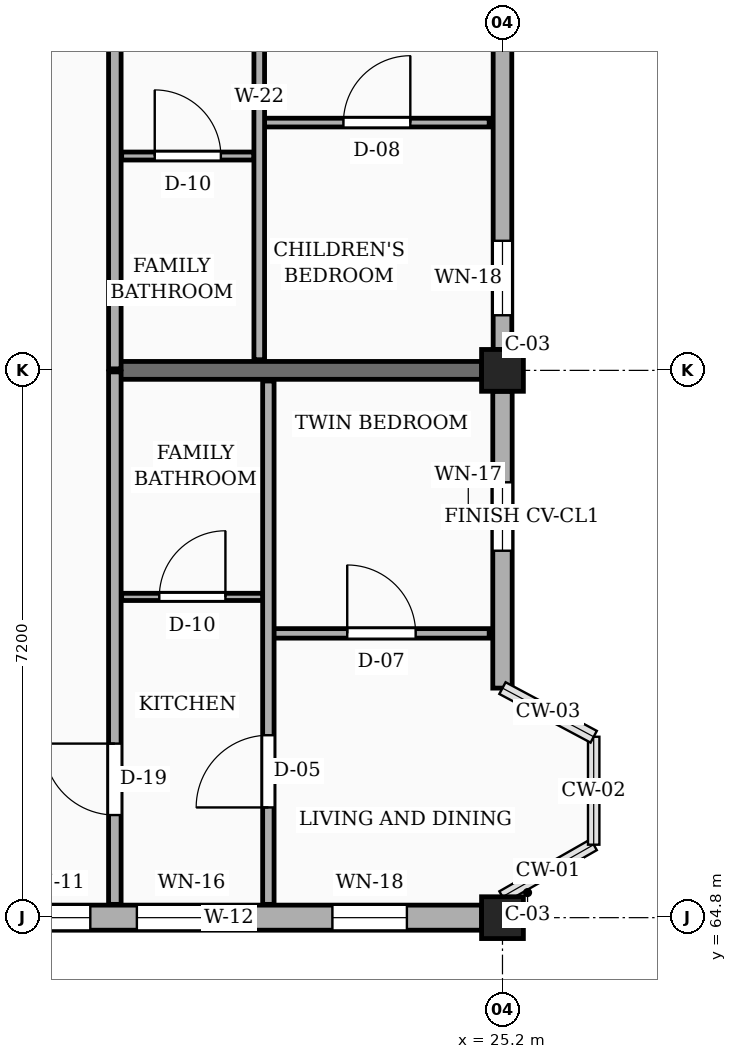
"""IFC4 building model, lengths in metres.
Left out: names, types, materials, properties, quantities, classifications, styles, units other than length and angle.
Written with IfcOpenShell. Run it as: python <this file> out.ifc"""

import sys

from ifc_helpers import new_model, si_unit, direction, frame, frame_2d, origin, origin_2d, place, context, subcontext, project, spatial, rectangle, extrude, element, fill, save


model = new_model("IFC4")
c1 = context("Model", 3, precision=1e-05, world=origin(), true_north=direction((0.0, 1.0)))
c2 = subcontext(c1, "Body", "Model", "MODEL_VIEW")
j1 = project(units=[si_unit("LENGTHUNIT", "METRE"), si_unit("PLANEANGLEUNIT", "RADIAN")], contexts=[c1])
p1 = place(None, origin())
s1 = spatial("IfcSite", under=j1, at=p1, CompositionType="ELEMENT")
p2 = place(p1, origin())
s2 = spatial("IfcBuilding", under=s1, at=p2, CompositionType="ELEMENT")
p3 = place(p2, frame((0.0, 0.0, 17.1)))
s3 = spatial("IfcBuildingStorey", under=s2, at=p3, CompositionType="ELEMENT", Elevation=17.1)
for number, where, z_axis, x_axis in (
    (1, (25.2, 64.8, 0.0), (0.0, 0.0, 1.0), (1.0, 0.0, 0.0)),
    (2, (25.2, 72.0, 0.0), (0.0, 0.0, 1.0), (1.0, 0.0, 0.0)),
):
    element("IfcColumn", number, at=place(p3, frame(where, z_axis=z_axis, x_axis=x_axis)), inside=s3, PredefinedType="COLUMN", context=c2, shape_type="SweptSolid", body=[
        extrude(rectangle(XDim=0.55, YDim=0.55, at=origin_2d()), origin(), (0.0, 0.0, 1.0), 3.15),
    ])
p4 = place(p3, frame((20.1, 72.0, 0.0), z_axis=(0.0, 0.0, 1.0), x_axis=(1.0, 0.0, 0.0)))
e3 = element("IfcWall", 3, at=p4, inside=s3, PredefinedType="SOLIDWALL", context=c2, shape_type="SweptSolid", body=[
    extrude(rectangle(XDim=4.825, YDim=0.235, at=frame_2d((2.413, 0.0))), origin(), (0.0, 0.0, 1.0), 2.21),
])
p5 = place(p3, frame((18.275, 64.8, 0.0), z_axis=(0.0, 0.0, 1.0), x_axis=(1.0, 0.0, 0.0)))
e4 = element("IfcWall", 4, at=p5, inside=s3, PredefinedType="SOLIDWALL", context=c2, shape_type="SweptSolid", body=[
    extrude(rectangle(XDim=6.65, YDim=0.33, at=frame_2d((3.325, 0.0))), origin(), (0.0, 0.0, 1.0), 2.48),
])
p6 = place(p5, frame((0.462, 0.0, 0.78)))
e5 = element("IfcOpeningElement", 5, at=p6, cuts=e4, PredefinedType="OPENING", context=c2, shape_type="SweptSolid", body=[
    extrude(rectangle(XDim=1.04, YDim=1.26, at=frame_2d((0.52, 0.63))), frame((0.0, 0.175, 0.0), z_axis=(0.0, -1.0, 0.0), x_axis=(1.0, 0.0, 0.0)), (0.0, 0.0, 1.0), 0.35),
])
p7 = place(p5, frame((2.115, 0.0, 0.78)))
e6 = element("IfcOpeningElement", 6, at=p7, cuts=e4, PredefinedType="OPENING", context=c2, shape_type="SweptSolid", body=[
    extrude(rectangle(XDim=1.44, YDim=1.26, at=frame_2d((0.72, 0.63))), frame((0.0, 0.175, 0.0), z_axis=(0.0, -1.0, 0.0), x_axis=(1.0, 0.0, 0.0)), (0.0, 0.0, 1.0), 0.35),
])
p8 = place(p5, frame((4.688, 0.0, 0.78)))
e7 = element("IfcOpeningElement", 7, at=p8, cuts=e4, PredefinedType="OPENING", context=c2, shape_type="SweptSolid", body=[
    extrude(rectangle(XDim=0.98, YDim=1.36, at=frame_2d((0.49, 0.68))), frame((0.0, 0.175, 0.0), z_axis=(0.0, -1.0, 0.0), x_axis=(1.0, 0.0, 0.0)), (0.0, 0.0, 1.0), 0.35),
])
p9 = place(p3, frame((25.2, 67.82, 0.0), z_axis=(0.0, 0.0, 1.0), x_axis=(0.0, 1.0, 0.0)))
e8 = element("IfcWall", 8, at=p9, inside=s3, PredefinedType="SOLIDWALL", context=c2, shape_type="SweptSolid", body=[
    extrude(rectangle(XDim=3.905, YDim=0.255, at=frame_2d((1.953, 0.0))), origin(), (0.0, 0.0, 1.0), 2.48),
])
p10 = place(p9, frame((1.808, 0.0, 0.78)))
e9 = element("IfcOpeningElement", 9, at=p10, cuts=e8, PredefinedType="OPENING", context=c2, shape_type="SweptSolid", body=[
    extrude(rectangle(XDim=0.9, YDim=1.36, at=frame_2d((0.45, 0.68))), frame((0.0, 0.137, 0.0), z_axis=(0.0, -1.0, 0.0), x_axis=(1.0, 0.0, 0.0)), (0.0, 0.0, 1.0), 0.275),
])
p11 = place(p3, frame((25.2, 72.275, 0.0), z_axis=(0.0, 0.0, 1.0), x_axis=(0.0, 1.0, 0.0)))
e10 = element("IfcWall", 10, at=p11, inside=s3, PredefinedType="SOLIDWALL", context=c2, shape_type="SweptSolid", body=[
    extrude(rectangle(XDim=6.65, YDim=0.245, at=frame_2d((3.325, 0.0))), origin(), (0.0, 0.0, 1.0), 2.48),
])
p12 = place(p11, frame((0.45, 0.0, 0.78)))
e11 = element("IfcOpeningElement", 11, at=p12, cuts=e10, PredefinedType="OPENING", context=c2, shape_type="SweptSolid", body=[
    extrude(rectangle(XDim=0.98, YDim=1.36, at=frame_2d((0.49, 0.68))), frame((0.0, 0.133, 0.0), z_axis=(0.0, -1.0, 0.0), x_axis=(1.0, 0.0, 0.0)), (0.0, 0.0, 1.0), 0.265),
])
p13 = place(p11, frame((4.65, 0.0, 0.78)))
e12 = element("IfcOpeningElement", 12, at=p13, cuts=e10, PredefinedType="OPENING", context=c2, shape_type="SweptSolid", body=[
    extrude(rectangle(XDim=1.14, YDim=1.36, at=frame_2d((0.57, 0.68))), frame((0.0, 0.133, 0.0), z_axis=(0.0, -1.0, 0.0), x_axis=(1.0, 0.0, 0.0)), (0.0, 0.0, 1.0), 0.265),
])
p14 = place(p3, frame((20.1, 64.975, 0.0), z_axis=(0.0, 0.0, 1.0), x_axis=(0.0, 1.0, 0.0)))
e13 = element("IfcWall", 13, at=p14, inside=s3, PredefinedType="PARTITIONING", context=c2, shape_type="SweptSolid", body=[
    extrude(rectangle(XDim=7.005, YDim=0.165, at=frame_2d((3.502, 0.0))), origin(), (0.0, 0.0, 1.0), 2.345),
])
p15 = place(p14, frame((1.175, 0.0, 0.0)))
e14 = element("IfcOpeningElement", 14, at=p15, cuts=e13, PredefinedType="OPENING", context=c2, shape_type="SweptSolid", body=[
    extrude(rectangle(XDim=0.94, YDim=2.12, at=frame_2d((0.47, 1.06))), frame((0.0, 0.093, 0.0), z_axis=(0.0, -1.0, 0.0), x_axis=(1.0, 0.0, 0.0)), (0.0, 0.0, 1.0), 0.185),
])
p16 = place(p3, frame((20.1, 72.02, 0.0), z_axis=(0.0, 0.0, 1.0), x_axis=(0.0, 1.0, 0.0)))
e15 = element("IfcWall", 15, at=p16, inside=s3, PredefinedType="PARTITIONING", context=c2, shape_type="SweptSolid", body=[
    extrude(rectangle(XDim=7.16, YDim=0.165, at=frame_2d((3.58, 0.0))), origin(), (0.0, 0.0, 1.0), 2.345),
])
p17 = place(p16, frame((4.78, 0.0, 0.0)))
e16 = element("IfcOpeningElement", 16, at=p17, cuts=e15, PredefinedType="OPENING", context=c2, shape_type="SweptSolid", body=[
    extrude(rectangle(XDim=1.14, YDim=2.18, at=frame_2d((0.57, 1.09))), frame((0.0, 0.093, 0.0), z_axis=(0.0, -1.0, 0.0), x_axis=(1.0, 0.0, 0.0)), (0.0, 0.0, 1.0), 0.185),
])
p18 = place(p3, frame((22.19, 68.54, 0.0), z_axis=(0.0, 0.0, 1.0), x_axis=(1.0, 0.0, 0.0)))
e17 = element("IfcWall", 17, at=p18, inside=s3, PredefinedType="PARTITIONING", context=c2, shape_type="SweptSolid", body=[
    extrude(rectangle(XDim=2.835, YDim=0.125, at=frame_2d((1.417, 0.0))), origin(), (0.0, 0.0, 1.0), 2.345),
])
p19 = place(p18, frame((0.968, 0.0, 0.0)))
e18 = element("IfcOpeningElement", 18, at=p19, cuts=e17, PredefinedType="OPENING", context=c2, shape_type="SweptSolid", body=[
    extrude(rectangle(XDim=0.9, YDim=2.1, at=frame_2d((0.45, 1.05))), frame((0.0, 0.073, 0.0), z_axis=(0.0, -1.0, 0.0), x_axis=(1.0, 0.0, 0.0)), (0.0, 0.0, 1.0), 0.145),
])
p20 = place(p3, frame((20.19, 69.02, 0.0), z_axis=(0.0, 0.0, 1.0), x_axis=(1.0, 0.0, 0.0)))
e19 = element("IfcWall", 19, at=p20, inside=s3, PredefinedType="PARTITIONING", context=c2, shape_type="SweptSolid", body=[
    extrude(rectangle(XDim=1.86, YDim=0.095, at=frame_2d((0.93, 0.0))), origin(), (0.0, 0.0, 1.0), 2.345),
])
p21 = place(p20, frame((0.495, 0.0, 0.0)))
e20 = element("IfcOpeningElement", 20, at=p21, cuts=e19, PredefinedType="OPENING", context=c2, shape_type="SweptSolid", body=[
    extrude(rectangle(XDim=0.87, YDim=2.05, at=frame_2d((0.435, 1.025))), frame((0.0, 0.058, 0.0), z_axis=(0.0, -1.0, 0.0), x_axis=(1.0, 0.0, 0.0)), (0.0, 0.0, 1.0), 0.115),
])
p22 = place(p3, frame((22.12, 64.975, 0.0), z_axis=(0.0, 0.0, 1.0), x_axis=(0.0, 1.0, 0.0)))
e21 = element("IfcWall", 21, at=p22, inside=s3, PredefinedType="PARTITIONING", context=c2, shape_type="SweptSolid", body=[
    extrude(rectangle(XDim=6.885, YDim=0.15, at=frame_2d((3.442, 0.0))), origin(), (0.0, 0.0, 1.0), 2.345),
])
p23 = place(p22, frame((1.275, 0.0, 0.0)))
e22 = element("IfcOpeningElement", 22, at=p23, cuts=e21, PredefinedType="OPENING", context=c2, shape_type="SweptSolid", body=[
    extrude(rectangle(XDim=0.95, YDim=2.1, at=frame_2d((0.475, 1.05))), frame((0.0, 0.085, 0.0), z_axis=(0.0, -1.0, 0.0), x_axis=(1.0, 0.0, 0.0)), (0.0, 0.0, 1.0), 0.17),
])
p24 = place(p3, frame((22.07, 75.26, 0.0), z_axis=(0.0, 0.0, 1.0), x_axis=(1.0, 0.0, 0.0)))
e23 = element("IfcWall", 23, at=p24, inside=s3, PredefinedType="PARTITIONING", context=c2, shape_type="SweptSolid", body=[
    extrude(rectangle(XDim=2.955, YDim=0.115, at=frame_2d((1.478, 0.0))), origin(), (0.0, 0.0, 1.0), 2.345),
])
p25 = place(p24, frame((1.038, 0.0, 0.0)))
e24 = element("IfcOpeningElement", 24, at=p25, cuts=e23, PredefinedType="OPENING", context=c2, shape_type="SweptSolid", body=[
    extrude(rectangle(XDim=0.88, YDim=2.08, at=frame_2d((0.44, 1.04))), frame((0.0, 0.067, 0.0), z_axis=(0.0, -1.0, 0.0), x_axis=(1.0, 0.0, 0.0)), (0.0, 0.0, 1.0), 0.135),
])
p26 = place(p3, frame((20.19, 74.82, 0.0), z_axis=(0.0, 0.0, 1.0), x_axis=(1.0, 0.0, 0.0)))
e25 = element("IfcWall", 25, at=p26, inside=s3, PredefinedType="PARTITIONING", context=c2, shape_type="SweptSolid", body=[
    extrude(rectangle(XDim=1.74, YDim=0.105, at=frame_2d((0.87, 0.0))), origin(), (0.0, 0.0, 1.0), 2.345),
])
p27 = place(p26, frame((0.435, 0.0, 0.0)))
e26 = element("IfcOpeningElement", 26, at=p27, cuts=e25, PredefinedType="OPENING", context=c2, shape_type="SweptSolid", body=[
    extrude(rectangle(XDim=0.87, YDim=2.05, at=frame_2d((0.435, 1.025))), frame((0.0, 0.062, 0.0), z_axis=(0.0, -1.0, 0.0), x_axis=(1.0, 0.0, 0.0)), (0.0, 0.0, 1.0), 0.125),
])
p28 = place(p3, frame((22.0, 72.14, 0.0), z_axis=(0.0, 0.0, 1.0), x_axis=(0.0, 1.0, 0.0)))
e27 = element("IfcWall", 27, at=p28, inside=s3, PredefinedType="PARTITIONING", context=c2, shape_type="SweptSolid", body=[
    extrude(rectangle(XDim=6.92, YDim=0.14, at=frame_2d((3.46, 0.0))), origin(), (0.0, 0.0, 1.0), 2.345),
])
p29 = place(p28, frame((4.66, 0.0, 0.0)))
e28 = element("IfcOpeningElement", 28, at=p29, cuts=e27, PredefinedType="OPENING", context=c2, shape_type="SweptSolid", body=[
    extrude(rectangle(XDim=0.92, YDim=2.1, at=frame_2d((0.46, 1.05))), frame((0.0, 0.08, 0.0), z_axis=(0.0, -1.0, 0.0), x_axis=(1.0, 0.0, 0.0)), (0.0, 0.0, 1.0), 0.16),
])
p30 = place(p6, origin())
e29 = element("IfcWindow", 29, at=p30, inside=s3, PartitioningType="SINGLE_PANEL", PredefinedType="WINDOW", context=c2, shape_type="SweptSolid", body=[
    extrude(rectangle(XDim=1.04, YDim=1.26, at=frame_2d((0.52, 0.63))), frame((0.0, 0.03, 0.0), z_axis=(0.0, -1.0, 0.0), x_axis=(1.0, 0.0, 0.0)), (0.0, 0.0, 1.0), 0.06),
])
fill(e5, e29)
p31 = place(p7, origin())
e30 = element("IfcWindow", 30, at=p31, inside=s3, PartitioningType="SINGLE_PANEL", PredefinedType="WINDOW", context=c2, shape_type="SweptSolid", body=[
    extrude(rectangle(XDim=1.44, YDim=1.26, at=frame_2d((0.72, 0.63))), frame((0.0, 0.03, 0.0), z_axis=(0.0, -1.0, 0.0), x_axis=(1.0, 0.0, 0.0)), (0.0, 0.0, 1.0), 0.06),
])
fill(e6, e30)
p32 = place(p8, origin())
e31 = element("IfcWindow", 31, at=p32, inside=s3, PartitioningType="SINGLE_PANEL", PredefinedType="WINDOW", context=c2, shape_type="SweptSolid", body=[
    extrude(rectangle(XDim=0.98, YDim=1.36, at=frame_2d((0.49, 0.68))), frame((0.0, 0.03, 0.0), z_axis=(0.0, -1.0, 0.0), x_axis=(1.0, 0.0, 0.0)), (0.0, 0.0, 1.0), 0.06),
])
fill(e7, e31)
p33 = place(p10, origin())
e32 = element("IfcWindow", 32, at=p33, inside=s3, PartitioningType="SINGLE_PANEL", PredefinedType="WINDOW", context=c2, shape_type="SweptSolid", body=[
    extrude(rectangle(XDim=0.9, YDim=1.36, at=frame_2d((0.45, 0.68))), frame((0.0, 0.03, 0.0), z_axis=(0.0, -1.0, 0.0), x_axis=(1.0, 0.0, 0.0)), (0.0, 0.0, 1.0), 0.06),
])
fill(e9, e32)
p34 = place(p12, origin())
e33 = element("IfcWindow", 33, at=p34, inside=s3, PartitioningType="SINGLE_PANEL", PredefinedType="WINDOW", context=c2, shape_type="SweptSolid", body=[
    extrude(rectangle(XDim=0.98, YDim=1.36, at=frame_2d((0.49, 0.68))), frame((0.0, 0.03, 0.0), z_axis=(0.0, -1.0, 0.0), x_axis=(1.0, 0.0, 0.0)), (0.0, 0.0, 1.0), 0.06),
])
fill(e11, e33)
p35 = place(p15, origin())
e34 = element("IfcDoor", 34, at=p35, inside=s3, OperationType="SINGLE_SWING_RIGHT", PredefinedType="DOOR", context=c2, shape_type="SweptSolid", body=[
    extrude(rectangle(XDim=0.94, YDim=2.12, at=frame_2d((0.47, 1.06))), frame((0.0, 0.025, 0.0), z_axis=(0.0, -1.0, 0.0), x_axis=(1.0, 0.0, 0.0)), (0.0, 0.0, 1.0), 0.05),
])
fill(e14, e34)
p36 = place(p19, origin())
e35 = element("IfcDoor", 35, at=p36, inside=s3, OperationType="SINGLE_SWING_LEFT", PredefinedType="DOOR", context=c2, shape_type="SweptSolid", body=[
    extrude(rectangle(XDim=0.9, YDim=2.1, at=frame_2d((0.45, 1.05))), frame((0.0, 0.025, 0.0), z_axis=(0.0, -1.0, 0.0), x_axis=(1.0, 0.0, 0.0)), (0.0, 0.0, 1.0), 0.05),
])
fill(e18, e35)
p37 = place(p21, origin())
e36 = element("IfcDoor", 36, at=p37, inside=s3, OperationType="SINGLE_SWING_RIGHT", PredefinedType="DOOR", context=c2, shape_type="SweptSolid", body=[
    extrude(rectangle(XDim=0.87, YDim=2.05, at=frame_2d((0.435, 1.025))), frame((0.0, 0.025, 0.0), z_axis=(0.0, -1.0, 0.0), x_axis=(1.0, 0.0, 0.0)), (0.0, 0.0, 1.0), 0.05),
])
fill(e20, e36)
p38 = place(p23, origin())
e37 = element("IfcDoor", 37, at=p38, inside=s3, OperationType="SINGLE_SWING_LEFT", PredefinedType="DOOR", context=c2, shape_type="SweptSolid", body=[
    extrude(rectangle(XDim=0.95, YDim=2.1, at=frame_2d((0.475, 1.05))), frame((0.0, 0.025, 0.0), z_axis=(0.0, -1.0, 0.0), x_axis=(1.0, 0.0, 0.0)), (0.0, 0.0, 1.0), 0.05),
])
fill(e22, e37)
p39 = place(p25, origin())
e38 = element("IfcDoor", 38, at=p39, inside=s3, OperationType="SINGLE_SWING_RIGHT", PredefinedType="DOOR", context=c2, shape_type="SweptSolid", body=[
    extrude(rectangle(XDim=0.88, YDim=2.08, at=frame_2d((0.44, 1.04))), frame((0.0, 0.025, 0.0), z_axis=(0.0, -1.0, 0.0), x_axis=(1.0, 0.0, 0.0)), (0.0, 0.0, 1.0), 0.05),
])
fill(e24, e38)
p40 = place(p27, origin())
e39 = element("IfcDoor", 39, at=p40, inside=s3, OperationType="SINGLE_SWING_LEFT", PredefinedType="DOOR", context=c2, shape_type="SweptSolid", body=[
    extrude(rectangle(XDim=0.87, YDim=2.05, at=frame_2d((0.435, 1.025))), frame((0.0, 0.025, 0.0), z_axis=(0.0, -1.0, 0.0), x_axis=(1.0, 0.0, 0.0)), (0.0, 0.0, 1.0), 0.05),
])
fill(e26, e39)
save(model, sys.argv[1])
